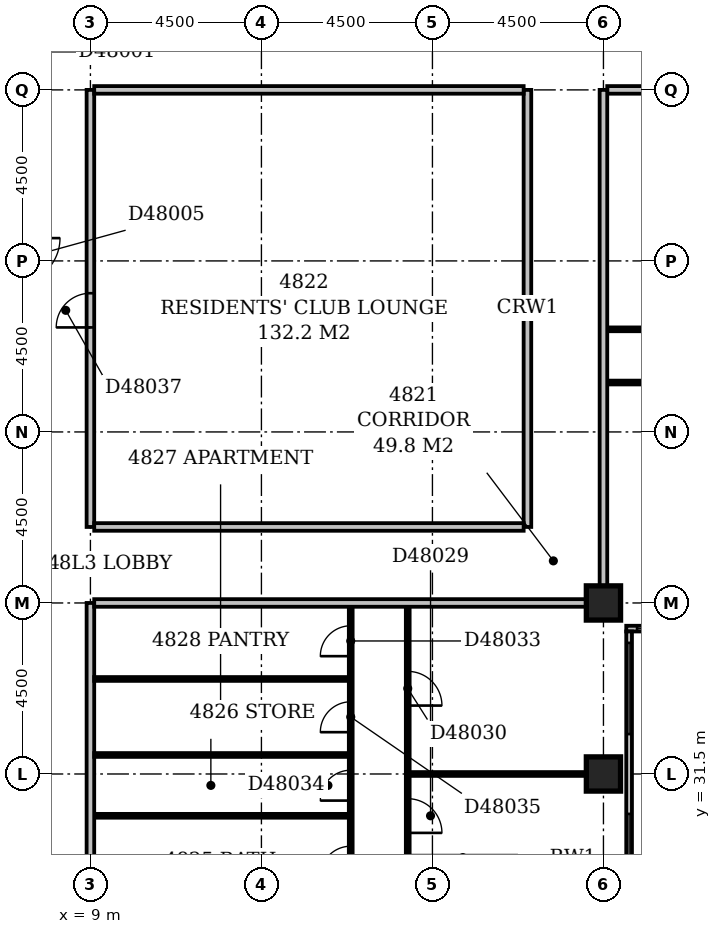
"""IFC4 building model, lengths in metres.
Left out: names, types, materials, properties, quantities, classifications, styles, units other than length and angle.
Written with IfcOpenShell. Run it as: python <this file> out.ifc"""

import sys

from ifc_helpers import new_model, si_unit, direction, frame, frame_2d, origin, origin_2d, place, context, subcontext, project, spatial, rectangle, extrude, element, fill, save


model = new_model("IFC4")
c1 = context("Model", 3, precision=1e-05, world=origin(), true_north=direction((0.0, 1.0)))
c2 = subcontext(c1, "Body", "Model", "MODEL_VIEW")
j1 = project(units=[si_unit("LENGTHUNIT", "METRE"), si_unit("PLANEANGLEUNIT", "RADIAN")], contexts=[c1])
p1 = place(None, origin())
s1 = spatial("IfcSite", under=j1, at=p1, CompositionType="ELEMENT")
p2 = place(p1, origin())
s2 = spatial("IfcBuilding", under=s1, at=p2, CompositionType="ELEMENT")
p3 = place(p2, frame((0.0, 0.0, 189.8)))
s3 = spatial("IfcBuildingStorey", under=s2, at=p3, CompositionType="ELEMENT", Elevation=189.8)
for number, where, z_axis, x_axis in (
    (1, (22.5, 31.5, -0.3), (0.0, 0.0, 1.0), (1.0, 0.0, 0.0)),
    (2, (22.5, 36.0, -0.3), (0.0, 0.0, 1.0), (1.0, 0.0, 0.0)),
):
    element("IfcColumn", number, at=place(p3, frame(where, z_axis=z_axis, x_axis=x_axis)), inside=s3, PredefinedType="COLUMN", context=c2, shape_type="SweptSolid", body=[
        extrude(rectangle(XDim=0.9, YDim=0.9, at=origin_2d()), origin(), (0.0, 0.0, 1.0), 3.6),
    ])
p4 = place(p3, frame((23.175, 17.4, 0.0), z_axis=(0.0, 0.0, 1.0), x_axis=(0.0, 1.0, 0.0)))
e3 = element("IfcWall", 3, at=p4, inside=s3, PredefinedType="STANDARD", context=c2, shape_type="SweptSolid", body=[
    extrude(rectangle(XDim=17.85, YDim=0.15, at=frame_2d((8.925, 0.0))), origin(), (0.0, 0.0, 1.0), 2.7),
])
p5 = place(p4, frame((1.35, 0.0, 0.6)))
e4 = element("IfcOpeningElement", 4, at=p5, cuts=e3, PredefinedType="OPENING", context=c2, shape_type="SweptSolid", body=[
    extrude(rectangle(XDim=2.1, YDim=1.8, at=frame_2d((1.05, 0.9))), frame((0.0, 0.087, 0.0), z_axis=(0.0, -1.0, 0.0), x_axis=(1.0, 0.0, 0.0)), (0.0, 0.0, 1.0), 0.174),
])
p6 = place(p4, frame((6.15, 0.0, 0.6)))
e5 = element("IfcOpeningElement", 5, at=p6, cuts=e3, PredefinedType="OPENING", context=c2, shape_type="SweptSolid", body=[
    extrude(rectangle(XDim=2.4, YDim=1.8, at=frame_2d((1.2, 0.9))), frame((0.0, 0.087, 0.0), z_axis=(0.0, -1.0, 0.0), x_axis=(1.0, 0.0, 0.0)), (0.0, 0.0, 1.0), 0.174),
])
p7 = place(p4, frame((10.65, 0.0, 0.6)))
e6 = element("IfcOpeningElement", 6, at=p7, cuts=e3, PredefinedType="OPENING", context=c2, shape_type="SweptSolid", body=[
    extrude(rectangle(XDim=2.4, YDim=1.8, at=frame_2d((1.2, 0.9))), frame((0.0, 0.087, 0.0), z_axis=(0.0, -1.0, 0.0), x_axis=(1.0, 0.0, 0.0)), (0.0, 0.0, 1.0), 0.174),
])
p8 = place(p4, frame((15.15, 0.0, 0.6)))
e7 = element("IfcOpeningElement", 7, at=p8, cuts=e3, PredefinedType="OPENING", context=c2, shape_type="SweptSolid", body=[
    extrude(rectangle(XDim=2.4, YDim=1.8, at=frame_2d((1.2, 0.9))), frame((0.0, 0.087, 0.0), z_axis=(0.0, -1.0, 0.0), x_axis=(1.0, 0.0, 0.0)), (0.0, 0.0, 1.0), 0.174),
])
p9 = place(p3, frame((23.1, 35.325, 0.0), z_axis=(0.0, 0.0, 1.0), x_axis=(1.0, 0.0, 0.0)))
e8 = element("IfcWall", 8, at=p9, inside=s3, PredefinedType="STANDARD", context=c2, shape_type="SweptSolid", body=[
    extrude(rectangle(XDim=27.15, YDim=0.15, at=frame_2d((13.575, 0.0))), origin(), (0.0, 0.0, 1.0), 2.7),
])
p10 = place(p9, frame((0.285, 0.0, 0.6)))
e9 = element("IfcOpeningElement", 9, at=p10, cuts=e8, PredefinedType="OPENING", context=c2, shape_type="SweptSolid", body=[
    extrude(rectangle(XDim=2.1, YDim=1.8, at=frame_2d((1.05, 0.9))), frame((0.0, 0.087, 0.0), z_axis=(0.0, -1.0, 0.0), x_axis=(1.0, 0.0, 0.0)), (0.0, 0.0, 1.0), 0.174),
])
p11 = place(p9, frame((4.95, 0.0, 0.6)))
e10 = element("IfcOpeningElement", 10, at=p11, cuts=e8, PredefinedType="OPENING", context=c2, shape_type="SweptSolid", body=[
    extrude(rectangle(XDim=2.4, YDim=1.8, at=frame_2d((1.2, 0.9))), frame((0.0, 0.087, 0.0), z_axis=(0.0, -1.0, 0.0), x_axis=(1.0, 0.0, 0.0)), (0.0, 0.0, 1.0), 0.174),
])
p12 = place(p9, frame((9.45, 0.0, 0.6)))
e11 = element("IfcOpeningElement", 11, at=p12, cuts=e8, PredefinedType="OPENING", context=c2, shape_type="SweptSolid", body=[
    extrude(rectangle(XDim=2.4, YDim=1.8, at=frame_2d((1.2, 0.9))), frame((0.0, 0.087, 0.0), z_axis=(0.0, -1.0, 0.0), x_axis=(1.0, 0.0, 0.0)), (0.0, 0.0, 1.0), 0.174),
])
p13 = place(p9, frame((13.95, 0.0, 0.6)))
e12 = element("IfcOpeningElement", 12, at=p13, cuts=e8, PredefinedType="OPENING", context=c2, shape_type="SweptSolid", body=[
    extrude(rectangle(XDim=2.4, YDim=1.8, at=frame_2d((1.2, 0.9))), frame((0.0, 0.087, 0.0), z_axis=(0.0, -1.0, 0.0), x_axis=(1.0, 0.0, 0.0)), (0.0, 0.0, 1.0), 0.174),
])
p14 = place(p9, frame((18.45, 0.0, 0.6)))
e13 = element("IfcOpeningElement", 13, at=p14, cuts=e8, PredefinedType="OPENING", context=c2, shape_type="SweptSolid", body=[
    extrude(rectangle(XDim=2.4, YDim=1.8, at=frame_2d((1.2, 0.9))), frame((0.0, 0.087, 0.0), z_axis=(0.0, -1.0, 0.0), x_axis=(1.0, 0.0, 0.0)), (0.0, 0.0, 1.0), 0.174),
])
p15 = place(p9, frame((24.179, 0.0, 0.6)))
e14 = element("IfcOpeningElement", 14, at=p15, cuts=e8, PredefinedType="OPENING", context=c2, shape_type="SweptSolid", body=[
    extrude(rectangle(XDim=1.5, YDim=1.8, at=frame_2d((0.75, 0.9))), frame((0.0, 0.087, 0.0), z_axis=(0.0, -1.0, 0.0), x_axis=(1.0, 0.0, 0.0)), (0.0, 0.0, 1.0), 0.174),
])
p16 = place(p3, frame((9.0, 5.0, 0.0), z_axis=(0.0, 0.0, 1.0), x_axis=(0.0, 1.0, 0.0)))
e15 = element("IfcWall", 15, at=p16, inside=s3, PredefinedType="PARTITIONING", context=c2, shape_type="SweptSolid", body=[
    extrude(rectangle(XDim=31.0, YDim=0.2, at=frame_2d((15.5, 0.0))), origin(), (0.0, 0.0, 1.0), 3.3),
])
p17 = place(p16, frame((17.8, 0.0, 0.0)))
e16 = element("IfcOpeningElement", 16, at=p17, cuts=e15, PredefinedType="OPENING", context=c2, shape_type="SweptSolid", body=[
    extrude(rectangle(XDim=1.0, YDim=2.1, at=frame_2d((0.5, 1.05))), frame((0.0, 0.112, 0.0), z_axis=(0.0, -1.0, 0.0), x_axis=(1.0, 0.0, 0.0)), (0.0, 0.0, 1.0), 0.224),
])
p18 = place(p16, frame((14.95, 0.0, 0.0)))
e17 = element("IfcOpeningElement", 17, at=p18, cuts=e15, PredefinedType="OPENING", context=c2, shape_type="SweptSolid", body=[
    extrude(rectangle(XDim=1.0, YDim=2.1, at=frame_2d((0.5, 1.05))), frame((0.0, 0.112, 0.0), z_axis=(0.0, -1.0, 0.0), x_axis=(1.0, 0.0, 0.0)), (0.0, 0.0, 1.0), 0.224),
])
p19 = place(p16, frame((9.3, 0.0, 0.0)))
e18 = element("IfcOpeningElement", 18, at=p19, cuts=e15, PredefinedType="OPENING", context=c2, shape_type="SweptSolid", body=[
    extrude(rectangle(XDim=1.0, YDim=2.1, at=frame_2d((0.5, 1.05))), frame((0.0, 0.112, 0.0), z_axis=(0.0, -1.0, 0.0), x_axis=(1.0, 0.0, 0.0)), (0.0, 0.0, 1.0), 0.224),
])
p20 = place(p16, frame((1.5, 0.0, 0.0)))
e19 = element("IfcOpeningElement", 19, at=p20, cuts=e15, PredefinedType="OPENING", context=c2, shape_type="SweptSolid", body=[
    extrude(rectangle(XDim=0.9, YDim=2.1, at=frame_2d((0.45, 1.05))), frame((0.0, 0.112, 0.0), z_axis=(0.0, -1.0, 0.0), x_axis=(1.0, 0.0, 0.0)), (0.0, 0.0, 1.0), 0.224),
])
p21 = place(p3, frame((17.35, 22.6, 0.0), z_axis=(0.0, 0.0, 1.0), x_axis=(0.0, 1.0, 0.0)))
e20 = element("IfcWall", 20, at=p21, inside=s3, PredefinedType="PARTITIONING", context=c2, shape_type="SweptSolid", body=[
    extrude(rectangle(XDim=13.3, YDim=0.1, at=frame_2d((6.65, 0.0))), origin(), (0.0, 0.0, 1.0), 3.3),
])
p22 = place(p21, frame((1.7, 0.0, 0.0)))
e21 = element("IfcOpeningElement", 21, at=p22, cuts=e20, PredefinedType="OPENING", context=c2, shape_type="SweptSolid", body=[
    extrude(rectangle(XDim=0.9, YDim=2.1, at=frame_2d((0.45, 1.05))), frame((0.0, 0.062, 0.0), z_axis=(0.0, -1.0, 0.0), x_axis=(1.0, 0.0, 0.0)), (0.0, 0.0, 1.0), 0.124),
])
p23 = place(p21, frame((7.35, 0.0, 0.0)))
e22 = element("IfcOpeningElement", 22, at=p23, cuts=e20, PredefinedType="OPENING", context=c2, shape_type="SweptSolid", body=[
    extrude(rectangle(XDim=0.9, YDim=2.1, at=frame_2d((0.45, 1.05))), frame((0.0, 0.062, 0.0), z_axis=(0.0, -1.0, 0.0), x_axis=(1.0, 0.0, 0.0)), (0.0, 0.0, 1.0), 0.124),
])
p24 = place(p21, frame((10.7, 0.0, 0.0)))
e23 = element("IfcOpeningElement", 23, at=p24, cuts=e20, PredefinedType="OPENING", context=c2, shape_type="SweptSolid", body=[
    extrude(rectangle(XDim=0.9, YDim=2.1, at=frame_2d((0.45, 1.05))), frame((0.0, 0.062, 0.0), z_axis=(0.0, -1.0, 0.0), x_axis=(1.0, 0.0, 0.0)), (0.0, 0.0, 1.0), 0.124),
])
p25 = place(p3, frame((15.85, 24.1, 0.0), z_axis=(0.0, 0.0, 1.0), x_axis=(0.0, 1.0, 0.0)))
e24 = element("IfcWall", 24, at=p25, inside=s3, PredefinedType="PARTITIONING", context=c2, shape_type="SweptSolid", body=[
    extrude(rectangle(XDim=11.8, YDim=0.1, at=frame_2d((5.9, 0.0))), origin(), (0.0, 0.0, 1.0), 3.3),
])
p26 = place(p25, frame((4.7, 0.0, 0.0)))
e25 = element("IfcOpeningElement", 25, at=p26, cuts=e24, PredefinedType="OPENING", context=c2, shape_type="SweptSolid", body=[
    extrude(rectangle(XDim=0.8, YDim=2.1, at=frame_2d((0.4, 1.05))), frame((0.0, 0.062, 0.0), z_axis=(0.0, -1.0, 0.0), x_axis=(1.0, 0.0, 0.0)), (0.0, 0.0, 1.0), 0.124),
])
p27 = place(p25, frame((1.5, 0.0, 0.0)))
e26 = element("IfcOpeningElement", 26, at=p27, cuts=e24, PredefinedType="OPENING", context=c2, shape_type="SweptSolid", body=[
    extrude(rectangle(XDim=0.9, YDim=2.1, at=frame_2d((0.45, 1.05))), frame((0.0, 0.062, 0.0), z_axis=(0.0, -1.0, 0.0), x_axis=(1.0, 0.0, 0.0)), (0.0, 0.0, 1.0), 0.124),
])
p28 = place(p25, frame((10.5, 0.0, 0.0)))
e27 = element("IfcOpeningElement", 27, at=p28, cuts=e24, PredefinedType="OPENING", context=c2, shape_type="SweptSolid", body=[
    extrude(rectangle(XDim=0.8, YDim=2.1, at=frame_2d((0.4, 1.05))), frame((0.0, 0.062, 0.0), z_axis=(0.0, -1.0, 0.0), x_axis=(1.0, 0.0, 0.0)), (0.0, 0.0, 1.0), 0.124),
])
p29 = place(p25, frame((6.7, 0.0, 0.0)))
e28 = element("IfcOpeningElement", 28, at=p29, cuts=e24, PredefinedType="OPENING", context=c2, shape_type="SweptSolid", body=[
    extrude(rectangle(XDim=0.8, YDim=2.1, at=frame_2d((0.4, 1.05))), frame((0.0, 0.062, 0.0), z_axis=(0.0, -1.0, 0.0), x_axis=(1.0, 0.0, 0.0)), (0.0, 0.0, 1.0), 0.124),
])
p30 = place(p25, frame((8.5, 0.0, 0.0)))
e29 = element("IfcOpeningElement", 29, at=p30, cuts=e24, PredefinedType="OPENING", context=c2, shape_type="SweptSolid", body=[
    extrude(rectangle(XDim=0.8, YDim=2.1, at=frame_2d((0.4, 1.05))), frame((0.0, 0.062, 0.0), z_axis=(0.0, -1.0, 0.0), x_axis=(1.0, 0.0, 0.0)), (0.0, 0.0, 1.0), 0.124),
])
p31 = place(p3, frame((9.1, 30.4, 0.0), z_axis=(0.0, 0.0, 1.0), x_axis=(1.0, 0.0, 0.0)))
e30 = element("IfcWall", 30, at=p31, inside=s3, PredefinedType="PLUMBINGWALL", context=c2, shape_type="SweptSolid", body=[
    extrude(rectangle(XDim=6.7, YDim=0.1, at=frame_2d((3.35, 0.0))), origin(), (0.0, 0.0, 1.0), 3.3),
])
p32 = place(p3, frame((17.4, 31.5, 0.0), z_axis=(0.0, 0.0, 1.0), x_axis=(1.0, 0.0, 0.0)))
e31 = element("IfcWall", 31, at=p32, inside=s3, PredefinedType="PARTITIONING", context=c2, shape_type="SweptSolid", body=[
    extrude(rectangle(XDim=4.65, YDim=0.1, at=frame_2d((2.325, 0.0))), origin(), (0.0, 0.0, 1.0), 3.3),
])
for number, where, z_axis, x_axis in (
    (32, (9.1, 32.0, 0.0), (0.0, 0.0, 1.0), (1.0, 0.0, 0.0)),
    (33, (9.1, 34.0, 0.0), (0.0, 0.0, 1.0), (1.0, 0.0, 0.0)),
):
    element("IfcWall", number, at=place(p3, frame(where, z_axis=z_axis, x_axis=x_axis)), inside=s3, PredefinedType="PARTITIONING", context=c2, shape_type="SweptSolid", body=[
        extrude(rectangle(XDim=6.7, YDim=0.1, at=frame_2d((3.35, 0.0))), origin(), (0.0, 0.0, 1.0), 3.3),
    ])
p33 = place(p3, frame((9.1, 36.0, 0.0), z_axis=(0.0, 0.0, 1.0), x_axis=(1.0, 0.0, 0.0)))
e34 = element("IfcWall", 34, at=p33, inside=s3, PredefinedType="PARTITIONING", context=c2, shape_type="SweptSolid", body=[
    extrude(rectangle(XDim=12.95, YDim=0.2, at=frame_2d((6.475, 0.0))), origin(), (0.0, 0.0, 1.0), 3.3),
])
p34 = place(p3, frame((22.5, 36.45, 0.0), z_axis=(0.0, 0.0, 1.0), x_axis=(0.0, 1.0, 0.0)))
e35 = element("IfcWall", 35, at=p34, inside=s3, PredefinedType="PARTITIONING", context=c2, shape_type="SweptSolid", body=[
    extrude(rectangle(XDim=13.05, YDim=0.2, at=frame_2d((6.525, 0.0))), origin(), (0.0, 0.0, 1.0), 3.3),
])
p35 = place(p3, frame((9.0, 38.0, 0.0), z_axis=(0.0, 0.0, 1.0), x_axis=(0.0, 1.0, 0.0)))
e36 = element("IfcWall", 36, at=p35, inside=s3, PredefinedType="PARTITIONING", context=c2, shape_type="SweptSolid", body=[
    extrude(rectangle(XDim=11.5, YDim=0.2, at=frame_2d((5.75, 0.0))), origin(), (0.0, 0.0, 1.0), 3.3),
])
p36 = place(p35, frame((5.25, 0.0, 0.0)))
e37 = element("IfcOpeningElement", 37, at=p36, cuts=e36, PredefinedType="OPENING", context=c2, shape_type="SweptSolid", body=[
    extrude(rectangle(XDim=0.9, YDim=2.1, at=frame_2d((0.45, 1.05))), frame((0.0, 0.112, 0.0), z_axis=(0.0, -1.0, 0.0), x_axis=(1.0, 0.0, 0.0)), (0.0, 0.0, 1.0), 0.224),
])
p37 = place(p3, frame((9.1, 38.0, 0.0), z_axis=(0.0, 0.0, 1.0), x_axis=(1.0, 0.0, 0.0)))
e38 = element("IfcWall", 38, at=p37, inside=s3, PredefinedType="PARTITIONING", context=c2, shape_type="SweptSolid", body=[
    extrude(rectangle(XDim=11.3, YDim=0.2, at=frame_2d((5.65, 0.0))), origin(), (0.0, 0.0, 1.0), 3.3),
])
p38 = place(p3, frame((20.5, 38.0, 0.0), z_axis=(0.0, 0.0, 1.0), x_axis=(0.0, 1.0, 0.0)))
e39 = element("IfcWall", 39, at=p38, inside=s3, PredefinedType="PARTITIONING", context=c2, shape_type="SweptSolid", body=[
    extrude(rectangle(XDim=11.5, YDim=0.2, at=frame_2d((5.75, 0.0))), origin(), (0.0, 0.0, 1.0), 3.3),
])
p39 = place(p3, frame((22.6, 41.8, 0.0), z_axis=(0.0, 0.0, 1.0), x_axis=(1.0, 0.0, 0.0)))
e40 = element("IfcWall", 40, at=p39, inside=s3, PredefinedType="PARTITIONING", context=c2, shape_type="SweptSolid", body=[
    extrude(rectangle(XDim=13.3, YDim=0.1, at=frame_2d((6.65, 0.0))), origin(), (0.0, 0.0, 1.0), 3.3),
])
p40 = place(p39, frame((1.7, 0.0, 0.0)))
e41 = element("IfcOpeningElement", 41, at=p40, cuts=e40, PredefinedType="OPENING", context=c2, shape_type="SweptSolid", body=[
    extrude(rectangle(XDim=0.9, YDim=2.1, at=frame_2d((0.45, 1.05))), frame((0.0, 0.062, 0.0), z_axis=(0.0, -1.0, 0.0), x_axis=(1.0, 0.0, 0.0)), (0.0, 0.0, 1.0), 0.124),
])
p41 = place(p39, frame((6.2, 0.0, 0.0)))
e42 = element("IfcOpeningElement", 42, at=p41, cuts=e40, PredefinedType="OPENING", context=c2, shape_type="SweptSolid", body=[
    extrude(rectangle(XDim=0.9, YDim=2.1, at=frame_2d((0.45, 1.05))), frame((0.0, 0.062, 0.0), z_axis=(0.0, -1.0, 0.0), x_axis=(1.0, 0.0, 0.0)), (0.0, 0.0, 1.0), 0.124),
])
p42 = place(p39, frame((10.7, 0.0, 0.0)))
e43 = element("IfcOpeningElement", 43, at=p42, cuts=e40, PredefinedType="OPENING", context=c2, shape_type="SweptSolid", body=[
    extrude(rectangle(XDim=0.9, YDim=2.1, at=frame_2d((0.45, 1.05))), frame((0.0, 0.062, 0.0), z_axis=(0.0, -1.0, 0.0), x_axis=(1.0, 0.0, 0.0)), (0.0, 0.0, 1.0), 0.124),
])
p43 = place(p3, frame((22.6, 43.2, 0.0), z_axis=(0.0, 0.0, 1.0), x_axis=(1.0, 0.0, 0.0)))
e44 = element("IfcWall", 44, at=p43, inside=s3, PredefinedType="PARTITIONING", context=c2, shape_type="SweptSolid", body=[
    extrude(rectangle(XDim=5.75, YDim=0.1, at=frame_2d((2.875, 0.0))), origin(), (0.0, 0.0, 1.0), 3.3),
])
p44 = place(p43, frame((2.4, 0.0, 0.0)))
e45 = element("IfcOpeningElement", 45, at=p44, cuts=e44, PredefinedType="OPENING", context=c2, shape_type="SweptSolid", body=[
    extrude(rectangle(XDim=0.9, YDim=2.1, at=frame_2d((0.45, 1.05))), frame((0.0, 0.062, 0.0), z_axis=(0.0, -1.0, 0.0), x_axis=(1.0, 0.0, 0.0)), (0.0, 0.0, 1.0), 0.124),
])
p45 = place(p3, frame((9.1, 49.5, 0.0), z_axis=(0.0, 0.0, 1.0), x_axis=(1.0, 0.0, 0.0)))
e46 = element("IfcWall", 46, at=p45, inside=s3, PredefinedType="PARTITIONING", context=c2, shape_type="SweptSolid", body=[
    extrude(rectangle(XDim=11.3, YDim=0.2, at=frame_2d((5.65, 0.0))), origin(), (0.0, 0.0, 1.0), 3.3),
])
p46 = place(p3, frame((22.6, 49.5, 0.0), z_axis=(0.0, 0.0, 1.0), x_axis=(1.0, 0.0, 0.0)))
e47 = element("IfcWall", 47, at=p46, inside=s3, PredefinedType="PARTITIONING", context=c2, shape_type="SweptSolid", body=[
    extrude(rectangle(XDim=30.95, YDim=0.2, at=frame_2d((15.475, 0.0))), origin(), (0.0, 0.0, 1.0), 3.3),
])
p47 = place(p46, frame((6.1, 0.0, 0.0)))
e48 = element("IfcOpeningElement", 48, at=p47, cuts=e47, PredefinedType="OPENING", context=c2, shape_type="SweptSolid", body=[
    extrude(rectangle(XDim=1.0, YDim=2.1, at=frame_2d((0.5, 1.05))), frame((0.0, 0.112, 0.0), z_axis=(0.0, -1.0, 0.0), x_axis=(1.0, 0.0, 0.0)), (0.0, 0.0, 1.0), 0.224),
])
p48 = place(p46, frame((13.7, 0.0, 0.0)))
e49 = element("IfcOpeningElement", 49, at=p48, cuts=e47, PredefinedType="OPENING", context=c2, shape_type="SweptSolid", body=[
    extrude(rectangle(XDim=1.0, YDim=2.1, at=frame_2d((0.5, 1.05))), frame((0.0, 0.112, 0.0), z_axis=(0.0, -1.0, 0.0), x_axis=(1.0, 0.0, 0.0)), (0.0, 0.0, 1.0), 0.224),
])
p49 = place(p46, frame((27.15, 0.0, 0.0)))
e50 = element("IfcOpeningElement", 50, at=p49, cuts=e47, PredefinedType="OPENING", context=c2, shape_type="SweptSolid", body=[
    extrude(rectangle(XDim=1.0, YDim=2.1, at=frame_2d((0.5, 1.05))), frame((0.0, 0.112, 0.0), z_axis=(0.0, -1.0, 0.0), x_axis=(1.0, 0.0, 0.0)), (0.0, 0.0, 1.0), 0.224),
])
p50 = place(p7, origin())
e51 = element("IfcWindow", 51, at=p50, inside=s3, PartitioningType="SINGLE_PANEL", PredefinedType="WINDOW", context=c2, shape_type="SweptSolid", body=[
    extrude(rectangle(XDim=2.4, YDim=1.8, at=frame_2d((1.2, 0.9))), frame((0.0, 0.03, 0.0), z_axis=(0.0, -1.0, 0.0), x_axis=(1.0, 0.0, 0.0)), (0.0, 0.0, 1.0), 0.06),
])
fill(e6, e51)
p51 = place(p8, origin())
e52 = element("IfcWindow", 52, at=p51, inside=s3, PartitioningType="SINGLE_PANEL", PredefinedType="WINDOW", context=c2, shape_type="SweptSolid", body=[
    extrude(rectangle(XDim=2.4, YDim=1.8, at=frame_2d((1.2, 0.9))), frame((0.0, 0.03, 0.0), z_axis=(0.0, -1.0, 0.0), x_axis=(1.0, 0.0, 0.0)), (0.0, 0.0, 1.0), 0.06),
])
fill(e7, e52)
p52 = place(p10, origin())
e53 = element("IfcWindow", 53, at=p52, inside=s3, PartitioningType="SINGLE_PANEL", PredefinedType="WINDOW", context=c2, shape_type="SweptSolid", body=[
    extrude(rectangle(XDim=2.1, YDim=1.8, at=frame_2d((1.05, 0.9))), frame((0.0, 0.03, 0.0), z_axis=(0.0, -1.0, 0.0), x_axis=(1.0, 0.0, 0.0)), (0.0, 0.0, 1.0), 0.06),
])
fill(e9, e53)
p53 = place(p23, frame((0.9, 0.0, 0.0), z_axis=(0.0, 0.0, 1.0), x_axis=(-1.0, 0.0, 0.0)))
e54 = element("IfcDoor", 54, at=p53, inside=s3, OperationType="SINGLE_SWING_RIGHT", PredefinedType="DOOR", context=c2, shape_type="SweptSolid", body=[
    extrude(rectangle(XDim=0.9, YDim=2.1, at=frame_2d((0.45, 1.05))), frame((0.0, 0.025, 0.0), z_axis=(0.0, -1.0, 0.0), x_axis=(1.0, 0.0, 0.0)), (0.0, 0.0, 1.0), 0.05),
])
fill(e22, e54)
p54 = place(p24, frame((0.9, 0.0, 0.0), z_axis=(0.0, 0.0, 1.0), x_axis=(-1.0, 0.0, 0.0)))
e55 = element("IfcDoor", 55, at=p54, inside=s3, OperationType="SINGLE_SWING_RIGHT", PredefinedType="DOOR", context=c2, shape_type="SweptSolid", body=[
    extrude(rectangle(XDim=0.9, YDim=2.1, at=frame_2d((0.45, 1.05))), frame((0.0, 0.025, 0.0), z_axis=(0.0, -1.0, 0.0), x_axis=(1.0, 0.0, 0.0)), (0.0, 0.0, 1.0), 0.05),
])
fill(e23, e55)
p55 = place(p26, origin())
e56 = element("IfcDoor", 56, at=p55, inside=s3, OperationType="SINGLE_SWING_LEFT", PredefinedType="DOOR", context=c2, shape_type="SweptSolid", body=[
    extrude(rectangle(XDim=0.8, YDim=2.1, at=frame_2d((0.4, 1.05))), frame((0.0, 0.025, 0.0), z_axis=(0.0, -1.0, 0.0), x_axis=(1.0, 0.0, 0.0)), (0.0, 0.0, 1.0), 0.05),
])
fill(e25, e56)
p56 = place(p28, origin())
e57 = element("IfcDoor", 57, at=p56, inside=s3, OperationType="SINGLE_SWING_LEFT", PredefinedType="DOOR", context=c2, shape_type="SweptSolid", body=[
    extrude(rectangle(XDim=0.8, YDim=2.1, at=frame_2d((0.4, 1.05))), frame((0.0, 0.025, 0.0), z_axis=(0.0, -1.0, 0.0), x_axis=(1.0, 0.0, 0.0)), (0.0, 0.0, 1.0), 0.05),
])
fill(e27, e57)
p57 = place(p29, origin())
e58 = element("IfcDoor", 58, at=p57, inside=s3, OperationType="SINGLE_SWING_LEFT", PredefinedType="DOOR", context=c2, shape_type="SweptSolid", body=[
    extrude(rectangle(XDim=0.8, YDim=2.1, at=frame_2d((0.4, 1.05))), frame((0.0, 0.025, 0.0), z_axis=(0.0, -1.0, 0.0), x_axis=(1.0, 0.0, 0.0)), (0.0, 0.0, 1.0), 0.05),
])
fill(e28, e58)
p58 = place(p30, origin())
e59 = element("IfcDoor", 59, at=p58, inside=s3, OperationType="SINGLE_SWING_LEFT", PredefinedType="DOOR", context=c2, shape_type="SweptSolid", body=[
    extrude(rectangle(XDim=0.8, YDim=2.1, at=frame_2d((0.4, 1.05))), frame((0.0, 0.025, 0.0), z_axis=(0.0, -1.0, 0.0), x_axis=(1.0, 0.0, 0.0)), (0.0, 0.0, 1.0), 0.05),
])
fill(e29, e59)
p59 = place(p36, origin())
e60 = element("IfcDoor", 60, at=p59, inside=s3, OperationType="SINGLE_SWING_LEFT", PredefinedType="DOOR", context=c2, shape_type="SweptSolid", body=[
    extrude(rectangle(XDim=0.9, YDim=2.1, at=frame_2d((0.45, 1.05))), frame((0.0, 0.025, 0.0), z_axis=(0.0, -1.0, 0.0), x_axis=(1.0, 0.0, 0.0)), (0.0, 0.0, 1.0), 0.05),
])
fill(e37, e60)
save(model, sys.argv[1])
